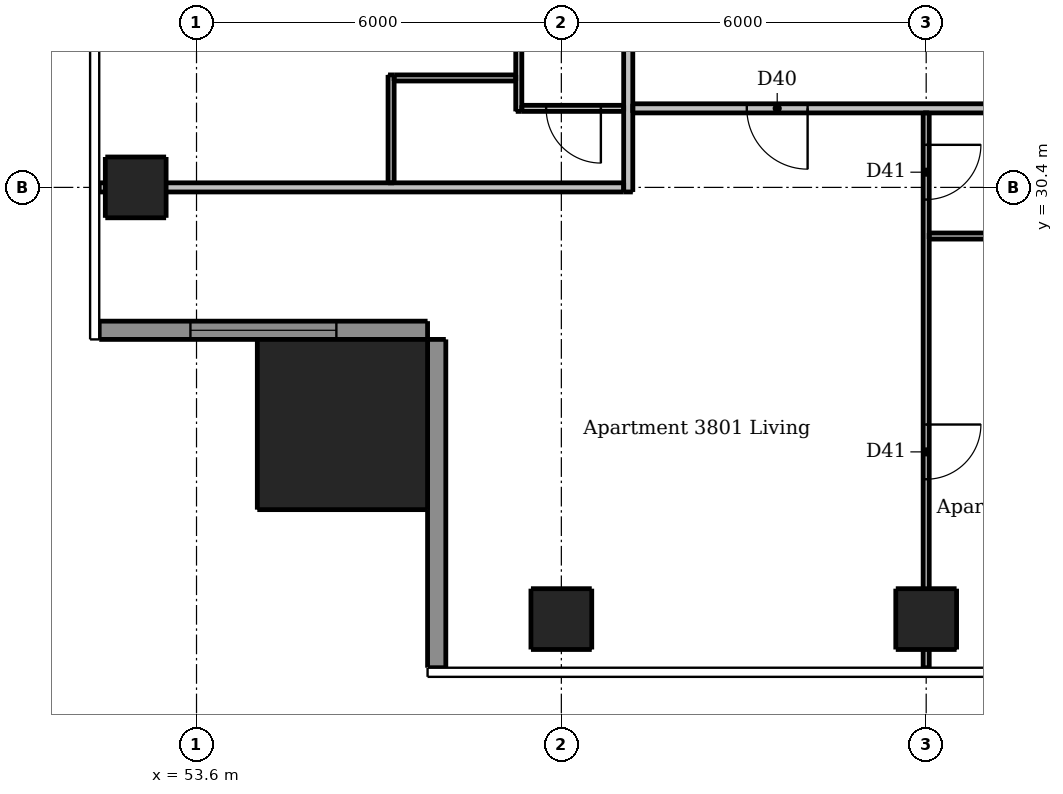
"""IFC4 building model, lengths in metres.
Left out: names, types, materials, properties, quantities, classifications, styles, units other than length and angle.
Written with IfcOpenShell. Run it as: python <this file> out.ifc"""

import sys

from ifc_helpers import new_model, si_unit, direction, frame, frame_2d, origin, origin_2d, place, context, subcontext, project, spatial, rectangle, extrude, element, fill, save


model = new_model("IFC4")
c1 = context("Model", 3, precision=1e-05, world=origin(), true_north=direction((0.0, 1.0)))
c2 = subcontext(c1, "Body", "Model", "MODEL_VIEW")
j1 = project(units=[si_unit("LENGTHUNIT", "METRE"), si_unit("PLANEANGLEUNIT", "RADIAN")], contexts=[c1])
p1 = place(None, origin())
s1 = spatial("IfcSite", under=j1, at=p1, CompositionType="ELEMENT")
p2 = place(p1, origin())
s2 = spatial("IfcBuilding", under=s1, at=p2, CompositionType="ELEMENT")
p3 = place(p2, frame((0.0, 0.0, 143.8)))
s3 = spatial("IfcBuildingStorey", under=s2, at=p3, CompositionType="ELEMENT", Elevation=143.8)
for number, where, z_axis, x_axis in (
    (1, (59.6, 23.3, 0.0), (0.0, 0.0, 1.0), (1.0, 0.0, 0.0)),
    (2, (65.6, 23.3, 0.0), (0.0, 0.0, 1.0), (1.0, 0.0, 0.0)),
    (3, (52.6, 30.4, 0.0), (0.0, 0.0, 1.0), (1.0, 0.0, 0.0)),
):
    element("IfcColumn", number, at=place(p3, frame(where, z_axis=z_axis, x_axis=x_axis)), inside=s3, PredefinedType="COLUMN", context=c2, shape_type="SweptSolid", body=[
        extrude(rectangle(XDim=1.0, YDim=1.0, at=origin_2d()), origin(), (0.0, 0.0, 1.0), 3.05),
    ])
p4 = place(p3, frame((56.0, 26.5, 0.0), z_axis=(0.0, 0.0, 1.0), x_axis=(1.0, 0.0, 0.0)))
e4 = element("IfcColumn", 4, at=p4, inside=s3, PredefinedType="COLUMN", context=c2, shape_type="SweptSolid", body=[
    extrude(rectangle(XDim=2.8, YDim=2.8, at=origin_2d()), origin(), (0.0, 0.0, 1.0), 3.3),
])
p5 = place(p3, frame((52.0, 28.05, 0.0), z_axis=(0.0, 0.0, 1.0), x_axis=(1.0, 0.0, 0.0)))
e5 = element("IfcWall", 5, at=p5, inside=s3, PredefinedType="SOLIDWALL", context=c2, shape_type="SweptSolid", body=[
    extrude(rectangle(XDim=5.4, YDim=0.3, at=frame_2d((2.7, 0.0))), origin(), (0.0, 0.0, 1.0), 3.05),
])
p6 = place(p5, frame((1.5, 0.0, 0.15)))
e6 = element("IfcOpeningElement", 6, at=p6, cuts=e5, PredefinedType="OPENING", context=c2, shape_type="SweptSolid", body=[
    extrude(rectangle(XDim=2.4, YDim=2.1, at=frame_2d((1.2, 1.05))), frame((0.0, 0.16, 0.0), z_axis=(0.0, -1.0, 0.0), x_axis=(1.0, 0.0, 0.0)), (0.0, 0.0, 1.0), 0.32),
])
p7 = place(p3, frame((57.55, 27.9, 0.0), z_axis=(0.0, 0.0, 1.0), x_axis=(0.0, -1.0, 0.0)))
e7 = element("IfcWall", 7, at=p7, inside=s3, PredefinedType="SOLIDWALL", context=c2, shape_type="SweptSolid", body=[
    extrude(rectangle(XDim=5.4, YDim=0.3, at=frame_2d((2.7, 0.0))), origin(), (0.0, 0.0, 1.0), 3.05),
])
p8 = place(p3, frame((56.8, 30.475, 0.0), z_axis=(0.0, 0.0, 1.0), x_axis=(0.0, 1.0, 0.0)))
e8 = element("IfcWall", 8, at=p8, inside=s3, PredefinedType="PARTITIONING", context=c2, shape_type="SweptSolid", body=[
    extrude(rectangle(XDim=1.775, YDim=0.1, at=frame_2d((0.887, 0.0))), origin(), (0.0, 0.0, 1.0), 3.05),
])
p9 = place(p3, frame((58.9, 31.65, 0.0), z_axis=(0.0, 0.0, 1.0), x_axis=(0.0, 1.0, 0.0)))
e9 = element("IfcWall", 9, at=p9, inside=s3, PredefinedType="PARTITIONING", context=c2, shape_type="SweptSolid", body=[
    extrude(rectangle(XDim=16.675, YDim=0.1, at=frame_2d((8.337, 0.0))), origin(), (0.0, 0.0, 1.0), 3.05),
])
p10 = place(p9, frame((2.8, 0.0, 0.0)))
e10 = element("IfcOpeningElement", 10, at=p10, cuts=e9, PredefinedType="OPENING", context=c2, shape_type="SweptSolid", body=[
    extrude(rectangle(XDim=0.9, YDim=2.1, at=frame_2d((0.45, 1.05))), frame((0.0, 0.06, 0.0), z_axis=(0.0, -1.0, 0.0), x_axis=(1.0, 0.0, 0.0)), (0.0, 0.0, 1.0), 0.12),
])
p11 = place(p9, frame((8.8, 0.0, 0.0)))
e11 = element("IfcOpeningElement", 11, at=p11, cuts=e9, PredefinedType="OPENING", context=c2, shape_type="SweptSolid", body=[
    extrude(rectangle(XDim=0.9, YDim=2.1, at=frame_2d((0.45, 1.05))), frame((0.0, 0.06, 0.0), z_axis=(0.0, -1.0, 0.0), x_axis=(1.0, 0.0, 0.0)), (0.0, 0.0, 1.0), 0.12),
])
p12 = place(p9, frame((6.4, 0.0, 0.0)))
e12 = element("IfcOpeningElement", 12, at=p12, cuts=e9, PredefinedType="OPENING", context=c2, shape_type="SweptSolid", body=[
    extrude(rectangle(XDim=0.9, YDim=2.1, at=frame_2d((0.45, 1.05))), frame((0.0, 0.06, 0.0), z_axis=(0.0, -1.0, 0.0), x_axis=(1.0, 0.0, 0.0)), (0.0, 0.0, 1.0), 0.12),
])
p13 = place(p9, frame((14.5, 0.0, 0.0)))
e13 = element("IfcOpeningElement", 13, at=p13, cuts=e9, PredefinedType="OPENING", context=c2, shape_type="SweptSolid", body=[
    extrude(rectangle(XDim=0.9, YDim=2.1, at=frame_2d((0.45, 1.05))), frame((0.0, 0.06, 0.0), z_axis=(0.0, -1.0, 0.0), x_axis=(1.0, 0.0, 0.0)), (0.0, 0.0, 1.0), 0.12),
])
p14 = place(p9, frame((11.55, 0.0, 0.0)))
e14 = element("IfcOpeningElement", 14, at=p14, cuts=e9, PredefinedType="OPENING", context=c2, shape_type="SweptSolid", body=[
    extrude(rectangle(XDim=0.8, YDim=2.1, at=frame_2d((0.4, 1.05))), frame((0.0, 0.06, 0.0), z_axis=(0.0, -1.0, 0.0), x_axis=(1.0, 0.0, 0.0)), (0.0, 0.0, 1.0), 0.12),
])
p15 = place(p3, frame((65.6, 31.625, 0.0), z_axis=(0.0, 0.0, 1.0), x_axis=(0.0, -1.0, 0.0)))
e15 = element("IfcWall", 15, at=p15, inside=s3, PredefinedType="PARTITIONING", context=c2, shape_type="SweptSolid", body=[
    extrude(rectangle(XDim=9.125, YDim=0.1, at=frame_2d((4.562, 0.0))), origin(), (0.0, 0.0, 1.0), 2.516),
])
p16 = place(p15, frame((0.525, 0.0, 0.0)))
e16 = element("IfcOpeningElement", 16, at=p16, cuts=e15, PredefinedType="OPENING", context=c2, shape_type="SweptSolid", body=[
    extrude(rectangle(XDim=0.9, YDim=2.1, at=frame_2d((0.45, 1.05))), frame((0.0, 0.06, 0.0), z_axis=(0.0, -1.0, 0.0), x_axis=(1.0, 0.0, 0.0)), (0.0, 0.0, 1.0), 0.12),
])
p17 = place(p15, frame((5.125, 0.0, 0.0)))
e17 = element("IfcOpeningElement", 17, at=p17, cuts=e15, PredefinedType="OPENING", context=c2, shape_type="SweptSolid", body=[
    extrude(rectangle(XDim=0.9, YDim=2.1, at=frame_2d((0.45, 1.05))), frame((0.0, 0.06, 0.0), z_axis=(0.0, -1.0, 0.0), x_axis=(1.0, 0.0, 0.0)), (0.0, 0.0, 1.0), 0.12),
])
p18 = place(p3, frame((56.85, 32.2, 0.0), z_axis=(0.0, 0.0, 1.0), x_axis=(1.0, 0.0, 0.0)))
e18 = element("IfcWall", 18, at=p18, inside=s3, PredefinedType="PARTITIONING", context=c2, shape_type="SweptSolid", body=[
    extrude(rectangle(XDim=2.0, YDim=0.1, at=frame_2d((1.0, 0.0))), origin(), (0.0, 0.0, 1.0), 3.05),
])
p19 = place(p3, frame((60.625, 31.7, 0.0), z_axis=(0.0, 0.0, 1.0), x_axis=(-1.0, 0.0, 0.0)))
e19 = element("IfcWall", 19, at=p19, inside=s3, PredefinedType="PARTITIONING", context=c2, shape_type="SweptSolid", body=[
    extrude(rectangle(XDim=1.675, YDim=0.1, at=frame_2d((0.837, 0.0))), origin(), (0.0, 0.0, 1.0), 3.05),
])
p20 = place(p19, frame((0.375, 0.0, 0.0)))
e20 = element("IfcOpeningElement", 20, at=p20, cuts=e19, PredefinedType="OPENING", context=c2, shape_type="SweptSolid", body=[
    extrude(rectangle(XDim=0.9, YDim=2.1, at=frame_2d((0.45, 1.05))), frame((0.0, 0.06, 0.0), z_axis=(0.0, -1.0, 0.0), x_axis=(1.0, 0.0, 0.0)), (0.0, 0.0, 1.0), 0.12),
])
p21 = place(p3, frame((65.65, 29.6, 0.0), z_axis=(0.0, 0.0, 1.0), x_axis=(1.0, 0.0, 0.0)))
e21 = element("IfcWall", 21, at=p21, inside=s3, PredefinedType="PARTITIONING", context=c2, shape_type="SweptSolid", body=[
    extrude(rectangle(XDim=8.9, YDim=0.1, at=frame_2d((4.45, 0.0))), origin(), (0.0, 0.0, 1.0), 3.05),
])
p22 = place(p21, frame((3.75, 0.0, 0.0)))
e22 = element("IfcOpeningElement", 22, at=p22, cuts=e21, PredefinedType="OPENING", context=c2, shape_type="SweptSolid", body=[
    extrude(rectangle(XDim=0.8, YDim=2.1, at=frame_2d((0.4, 1.05))), frame((0.0, 0.06, 0.0), z_axis=(0.0, -1.0, 0.0), x_axis=(1.0, 0.0, 0.0)), (0.0, 0.0, 1.0), 0.12),
])
p23 = place(p21, frame((7.0, 0.0, 0.0)))
e23 = element("IfcOpeningElement", 23, at=p23, cuts=e21, PredefinedType="OPENING", context=c2, shape_type="SweptSolid", body=[
    extrude(rectangle(XDim=0.9, YDim=2.1, at=frame_2d((0.45, 1.05))), frame((0.0, 0.06, 0.0), z_axis=(0.0, -1.0, 0.0), x_axis=(1.0, 0.0, 0.0)), (0.0, 0.0, 1.0), 0.12),
])
p24 = place(p3, frame((60.7, 30.325, 0.0), z_axis=(0.0, 0.0, 1.0), x_axis=(0.0, 1.0, 0.0)))
e24 = element("IfcWall", 24, at=p24, inside=s3, PredefinedType="PARTITIONING", context=c2, shape_type="SweptSolid", body=[
    extrude(rectangle(XDim=28.9, YDim=0.15, at=frame_2d((14.45, 0.0))), origin(), (0.0, 0.0, 1.0), 3.05),
])
p25 = place(p24, frame((9.225, 0.0, 0.0)))
e25 = element("IfcOpeningElement", 25, at=p25, cuts=e24, PredefinedType="OPENING", context=c2, shape_type="SweptSolid", body=[
    extrude(rectangle(XDim=1.0, YDim=2.1, at=frame_2d((0.5, 1.05))), frame((0.0, 0.085, 0.0), z_axis=(0.0, -1.0, 0.0), x_axis=(1.0, 0.0, 0.0)), (0.0, 0.0, 1.0), 0.17),
])
p26 = place(p24, frame((26.025, 0.0, 0.0)))
e26 = element("IfcOpeningElement", 26, at=p26, cuts=e24, PredefinedType="OPENING", context=c2, shape_type="SweptSolid", body=[
    extrude(rectangle(XDim=1.0, YDim=2.1, at=frame_2d((0.5, 1.05))), frame((0.0, 0.085, 0.0), z_axis=(0.0, -1.0, 0.0), x_axis=(1.0, 0.0, 0.0)), (0.0, 0.0, 1.0), 0.17),
])
p27 = place(p3, frame((89.525, 31.7, 0.0), z_axis=(0.0, 0.0, 1.0), x_axis=(-1.0, 0.0, 0.0)))
e27 = element("IfcWall", 27, at=p27, inside=s3, PredefinedType="PARTITIONING", context=c2, shape_type="SweptSolid", body=[
    extrude(rectangle(XDim=28.75, YDim=0.15, at=frame_2d((14.375, 0.0))), origin(), (0.0, 0.0, 1.0), 3.05),
])
p28 = place(p27, frame((25.875, 0.0, 0.0)))
e28 = element("IfcOpeningElement", 28, at=p28, cuts=e27, PredefinedType="OPENING", context=c2, shape_type="SweptSolid", body=[
    extrude(rectangle(XDim=1.0, YDim=2.1, at=frame_2d((0.5, 1.05))), frame((0.0, 0.085, 0.0), z_axis=(0.0, -1.0, 0.0), x_axis=(1.0, 0.0, 0.0)), (0.0, 0.0, 1.0), 0.17),
])
p29 = place(p27, frame((9.925, 0.0, 0.0)))
e29 = element("IfcOpeningElement", 29, at=p29, cuts=e27, PredefinedType="OPENING", context=c2, shape_type="SweptSolid", body=[
    extrude(rectangle(XDim=1.0, YDim=2.1, at=frame_2d((0.5, 1.05))), frame((0.0, 0.085, 0.0), z_axis=(0.0, -1.0, 0.0), x_axis=(1.0, 0.0, 0.0)), (0.0, 0.0, 1.0), 0.17),
])
p30 = place(p3, frame((52.0, 30.4, 0.0), z_axis=(0.0, 0.0, 1.0), x_axis=(1.0, 0.0, 0.0)))
e30 = element("IfcWall", 30, at=p30, inside=s3, PredefinedType="PARTITIONING", context=c2, shape_type="SweptSolid", body=[
    extrude(rectangle(XDim=8.625, YDim=0.15, at=frame_2d((4.312, 0.0))), origin(), (0.0, 0.0, 1.0), 2.647),
])
p31 = place(p6, origin())
e31 = element("IfcWindow", 31, at=p31, inside=s3, PartitioningType="DOUBLE_PANEL_VERTICAL", PredefinedType="WINDOW", context=c2, shape_type="SweptSolid", body=[
    extrude(rectangle(XDim=2.4, YDim=2.1, at=frame_2d((1.2, 1.05))), frame((0.0, 0.03, 0.0), z_axis=(0.0, -1.0, 0.0), x_axis=(1.0, 0.0, 0.0)), (0.0, 0.0, 1.0), 0.06),
])
fill(e6, e31)
p32 = place(p28, origin())
e32 = element("IfcDoor", 32, at=p32, inside=s3, OperationType="SINGLE_SWING_LEFT", PredefinedType="DOOR", context=c2, shape_type="SweptSolid", body=[
    extrude(rectangle(XDim=1.0, YDim=2.1, at=frame_2d((0.5, 1.05))), frame((0.0, 0.025, 0.0), z_axis=(0.0, -1.0, 0.0), x_axis=(1.0, 0.0, 0.0)), (0.0, 0.0, 1.0), 0.05),
])
fill(e28, e32)
p33 = place(p16, origin())
e33 = element("IfcDoor", 33, at=p33, inside=s3, OperationType="SINGLE_SWING_LEFT", PredefinedType="DOOR", context=c2, shape_type="SweptSolid", body=[
    extrude(rectangle(XDim=0.9, YDim=2.1, at=frame_2d((0.45, 1.05))), frame((0.0, 0.025, 0.0), z_axis=(0.0, -1.0, 0.0), x_axis=(1.0, 0.0, 0.0)), (0.0, 0.0, 1.0), 0.05),
])
fill(e16, e33)
p34 = place(p17, origin())
e34 = element("IfcDoor", 34, at=p34, inside=s3, OperationType="SINGLE_SWING_LEFT", PredefinedType="DOOR", context=c2, shape_type="SweptSolid", body=[
    extrude(rectangle(XDim=0.9, YDim=2.1, at=frame_2d((0.45, 1.05))), frame((0.0, 0.025, 0.0), z_axis=(0.0, -1.0, 0.0), x_axis=(1.0, 0.0, 0.0)), (0.0, 0.0, 1.0), 0.05),
])
fill(e17, e34)
p35 = place(p20, origin())
e35 = element("IfcDoor", 35, at=p35, inside=s3, OperationType="SINGLE_SWING_LEFT", PredefinedType="DOOR", context=c2, shape_type="SweptSolid", body=[
    extrude(rectangle(XDim=0.9, YDim=2.1, at=frame_2d((0.45, 1.05))), frame((0.0, 0.025, 0.0), z_axis=(0.0, -1.0, 0.0), x_axis=(1.0, 0.0, 0.0)), (0.0, 0.0, 1.0), 0.05),
])
fill(e20, e35)
save(model, sys.argv[1])
